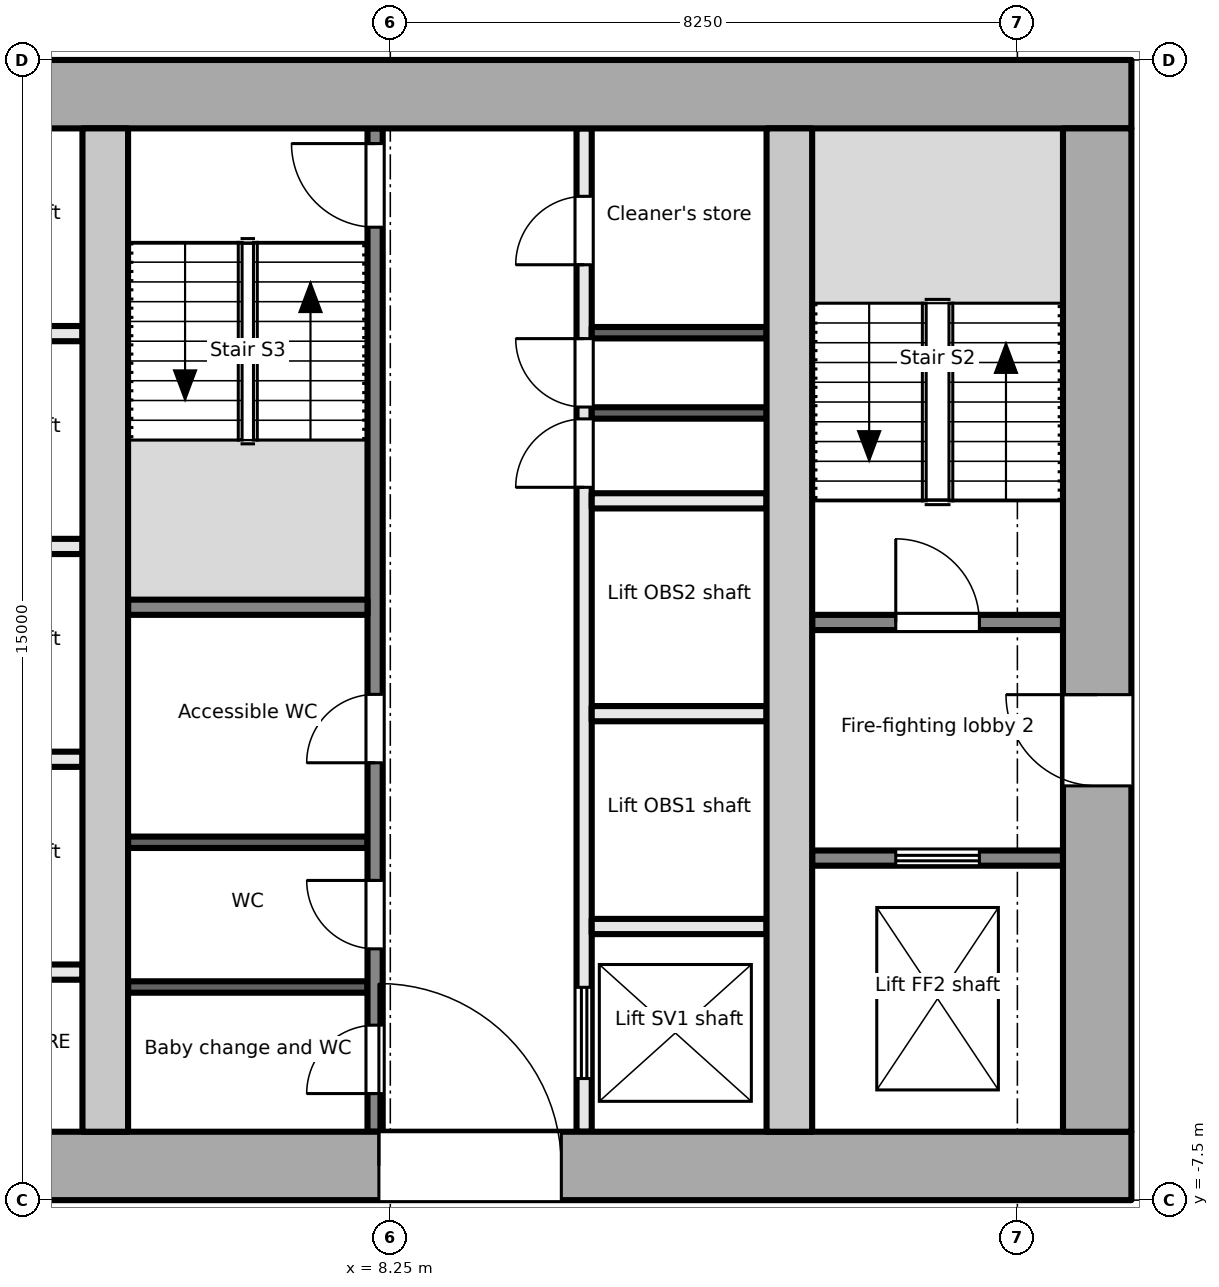
"""IFC4 building model, lengths in metres.
Left out: names, types, materials, properties, quantities, classifications, styles, units other than length and angle.
Written with IfcOpenShell. Run it as: python <this file> out.ifc"""

import sys

from ifc_helpers import new_model, si_unit, direction, frame, frame_2d, origin, place, context, subcontext, project, spatial, rectangle, extrude, element, fill, save


model = new_model("IFC4")
c1 = context("Model", 3, precision=1e-05, world=origin(), true_north=direction((0.0, 1.0)))
c2 = subcontext(c1, "Body", "Model", "MODEL_VIEW")
j1 = project(units=[si_unit("LENGTHUNIT", "METRE"), si_unit("PLANEANGLEUNIT", "RADIAN")], contexts=[c1])
p1 = place(None, origin())
s1 = spatial("IfcSite", under=j1, at=p1, CompositionType="ELEMENT")
p2 = place(p1, origin())
s2 = spatial("IfcBuilding", under=s1, at=p2, CompositionType="ELEMENT")
p3 = place(p2, frame((0.0, 0.0, 79.7)))
s3 = spatial("IfcBuildingStorey", under=s2, at=p3, CompositionType="ELEMENT", Elevation=79.7)
p4 = place(p3, frame((-18.0, -7.05, -0.2), z_axis=(0.0, 0.0, 1.0), x_axis=(1.0, 0.0, 0.0)))
e1 = element("IfcWall", 1, at=p4, inside=s3, PredefinedType="SHEAR", context=c2, shape_type="SweptSolid", body=[
    extrude(rectangle(XDim=36.0, YDim=0.9, at=frame_2d((18.0, 0.0))), origin(), (0.0, 0.0, 1.0), 4.0),
])
p5 = place(p4, frame((7.8, 0.0, 0.2)))
e2 = element("IfcOpeningElement", 2, at=p5, cuts=e1, PredefinedType="OPENING", context=c2, shape_type="SweptSolid", body=[
    extrude(rectangle(XDim=2.4, YDim=2.1, at=frame_2d((1.2, 1.05))), frame((0.0, 0.46, 0.0), z_axis=(0.0, -1.0, 0.0), x_axis=(1.0, 0.0, 0.0)), (0.0, 0.0, 1.0), 0.921),
])
p6 = place(p4, frame((17.4, 0.0, 0.2)))
e3 = element("IfcOpeningElement", 3, at=p6, cuts=e1, PredefinedType="OPENING", context=c2, shape_type="SweptSolid", body=[
    extrude(rectangle(XDim=1.2, YDim=2.1, at=frame_2d((0.6, 1.05))), frame((0.0, 0.46, 0.0), z_axis=(0.0, -1.0, 0.0), x_axis=(1.0, 0.0, 0.0)), (0.0, 0.0, 1.0), 0.921),
])
p7 = place(p4, frame((26.1, 0.0, 0.2)))
e4 = element("IfcOpeningElement", 4, at=p7, cuts=e1, PredefinedType="OPENING", context=c2, shape_type="SweptSolid", body=[
    extrude(rectangle(XDim=2.4, YDim=2.1, at=frame_2d((1.2, 1.05))), frame((0.0, 0.46, 0.0), z_axis=(0.0, -1.0, 0.0), x_axis=(1.0, 0.0, 0.0)), (0.0, 0.0, 1.0), 0.921),
])
p8 = place(p3, frame((-18.0, 7.05, -0.2), z_axis=(0.0, 0.0, 1.0), x_axis=(1.0, 0.0, 0.0)))
e5 = element("IfcWall", 5, at=p8, inside=s3, PredefinedType="SHEAR", context=c2, shape_type="SweptSolid", body=[
    extrude(rectangle(XDim=36.0, YDim=0.9, at=frame_2d((18.0, 0.0))), origin(), (0.0, 0.0, 1.0), 4.0),
])
p9 = place(p3, frame((17.55, -6.6, -0.2), z_axis=(0.0, 0.0, 1.0), x_axis=(0.0, 1.0, 0.0)))
e6 = element("IfcWall", 6, at=p9, inside=s3, PredefinedType="SHEAR", context=c2, shape_type="SweptSolid", body=[
    extrude(rectangle(XDim=13.2, YDim=0.9, at=frame_2d((6.6, 0.0))), origin(), (0.0, 0.0, 1.0), 4.0),
])
p10 = place(p9, frame((4.55, 0.0, 0.2)))
e7 = element("IfcOpeningElement", 7, at=p10, cuts=e6, PredefinedType="OPENING", context=c2, shape_type="SweptSolid", body=[
    extrude(rectangle(XDim=1.2, YDim=2.1, at=frame_2d((0.6, 1.05))), frame((0.0, 0.46, 0.0), z_axis=(0.0, -1.0, 0.0), x_axis=(1.0, 0.0, 0.0)), (0.0, 0.0, 1.0), 0.921),
])
for number, where, z_axis, x_axis in (
    (8, (4.5, -6.6, -0.2), (0.0, 0.0, 1.0), (0.0, 1.0, 0.0)),
    (9, (13.5, -6.6, -0.2), (0.0, 0.0, 1.0), (0.0, 1.0, 0.0)),
):
    element("IfcWall", number, at=place(p3, frame(where, z_axis=z_axis, x_axis=x_axis)), inside=s3, PredefinedType="SHEAR", context=c2, shape_type="SweptSolid", body=[
        extrude(rectangle(XDim=13.2, YDim=0.6, at=frame_2d((6.6, 0.0))), origin(), (0.0, 0.0, 1.0), 4.0),
    ])
p11 = place(p3, frame((13.8, -3.0, 0.0), z_axis=(0.0, 0.0, 1.0), x_axis=(1.0, 0.0, 0.0)))
e10 = element("IfcWall", 10, at=p11, inside=s3, PredefinedType="PARTITIONING", context=c2, shape_type="SweptSolid", body=[
    extrude(rectangle(XDim=3.3, YDim=0.2, at=frame_2d((1.65, 0.0))), origin(), (0.0, 0.0, 1.0), 3.8),
])
p12 = place(p11, frame((1.1, 0.0, 0.0)))
e11 = element("IfcOpeningElement", 11, at=p12, cuts=e10, PredefinedType="OPENING", context=c2, shape_type="SweptSolid", body=[
    extrude(rectangle(XDim=1.1, YDim=2.1, at=frame_2d((0.55, 1.05))), frame((0.0, 0.111, 0.0), z_axis=(0.0, -1.0, 0.0), x_axis=(1.0, 0.0, 0.0)), (0.0, 0.0, 1.0), 0.221),
])
p13 = place(p3, frame((13.8, 0.1, 0.0), z_axis=(0.0, 0.0, 1.0), x_axis=(1.0, 0.0, 0.0)))
e12 = element("IfcWall", 12, at=p13, inside=s3, PredefinedType="PARTITIONING", context=c2, shape_type="SweptSolid", body=[
    extrude(rectangle(XDim=3.3, YDim=0.2, at=frame_2d((1.65, 0.0))), origin(), (0.0, 0.0, 1.0), 3.8),
])
p14 = place(p13, frame((1.1, 0.0, 0.0)))
e13 = element("IfcOpeningElement", 13, at=p14, cuts=e12, PredefinedType="OPENING", context=c2, shape_type="SweptSolid", body=[
    extrude(rectangle(XDim=1.1, YDim=2.1, at=frame_2d((0.55, 1.05))), frame((0.0, 0.111, 0.0), z_axis=(0.0, -1.0, 0.0), x_axis=(1.0, 0.0, 0.0)), (0.0, 0.0, 1.0), 0.221),
])
for number, where, z_axis, x_axis in (
    (14, (1.9, -1.7, 0.0), (0.0, 0.0, 1.0), (1.0, 0.0, 0.0)),
    (15, (1.9, 1.1, 0.0), (0.0, 0.0, 1.0), (1.0, 0.0, 0.0)),
    (16, (1.9, 3.9, 0.0), (0.0, 0.0, 1.0), (1.0, 0.0, 0.0)),
    (17, (1.9, -4.5, 0.0), (0.0, 0.0, 1.0), (1.0, 0.0, 0.0)),
):
    element("IfcWall", number, at=place(p3, frame(where, z_axis=z_axis, x_axis=x_axis)), inside=s3, PredefinedType="PARTITIONING", context=c2, shape_type="SweptSolid", body=[
        extrude(rectangle(XDim=2.3, YDim=0.2, at=frame_2d((1.15, 0.0))), origin(), (0.0, 0.0, 1.0), 3.8),
    ])
p15 = place(p3, frame((8.05, -6.6, 0.0), z_axis=(0.0, 0.0, 1.0), x_axis=(0.0, 1.0, 0.0)))
e18 = element("IfcWall", 18, at=p15, inside=s3, PredefinedType="PARTITIONING", context=c2, shape_type="SweptSolid", body=[
    extrude(rectangle(XDim=13.2, YDim=0.2, at=frame_2d((6.6, 0.0))), origin(), (0.0, 0.0, 1.0), 3.8),
])
p16 = place(p15, frame((0.502, 0.0, 0.0)))
e19 = element("IfcOpeningElement", 19, at=p16, cuts=e18, PredefinedType="OPENING", context=c2, shape_type="SweptSolid", body=[
    extrude(rectangle(XDim=0.9, YDim=2.1, at=frame_2d((0.45, 1.05))), frame((0.0, 0.111, 0.0), z_axis=(0.0, -1.0, 0.0), x_axis=(1.0, 0.0, 0.0)), (0.0, 0.0, 1.0), 0.221),
])
p17 = place(p15, frame((2.406, 0.0, 0.0)))
e20 = element("IfcOpeningElement", 20, at=p17, cuts=e18, PredefinedType="OPENING", context=c2, shape_type="SweptSolid", body=[
    extrude(rectangle(XDim=0.9, YDim=2.1, at=frame_2d((0.45, 1.05))), frame((0.0, 0.111, 0.0), z_axis=(0.0, -1.0, 0.0), x_axis=(1.0, 0.0, 0.0)), (0.0, 0.0, 1.0), 0.221),
])
p18 = place(p15, frame((4.854, 0.0, 0.0)))
e21 = element("IfcOpeningElement", 21, at=p18, cuts=e18, PredefinedType="OPENING", context=c2, shape_type="SweptSolid", body=[
    extrude(rectangle(XDim=0.9, YDim=2.1, at=frame_2d((0.45, 1.05))), frame((0.0, 0.111, 0.0), z_axis=(0.0, -1.0, 0.0), x_axis=(1.0, 0.0, 0.0)), (0.0, 0.0, 1.0), 0.221),
])
p19 = place(p15, frame((11.9, 0.0, 0.0)))
e22 = element("IfcOpeningElement", 22, at=p19, cuts=e18, PredefinedType="OPENING", context=c2, shape_type="SweptSolid", body=[
    extrude(rectangle(XDim=1.1, YDim=2.1, at=frame_2d((0.55, 1.05))), frame((0.0, 0.111, 0.0), z_axis=(0.0, -1.0, 0.0), x_axis=(1.0, 0.0, 0.0)), (0.0, 0.0, 1.0), 0.221),
])
p20 = place(p3, frame((10.8, -6.6, 0.0), z_axis=(0.0, 0.0, 1.0), x_axis=(0.0, 1.0, 0.0)))
e23 = element("IfcWall", 23, at=p20, inside=s3, PredefinedType="PARTITIONING", context=c2, shape_type="SweptSolid", body=[
    extrude(rectangle(XDim=13.2, YDim=0.2, at=frame_2d((6.6, 0.0))), origin(), (0.0, 0.0, 1.0), 3.8),
])
p21 = place(p20, frame((0.7, 0.0, 0.0)))
e24 = element("IfcOpeningElement", 24, at=p21, cuts=e23, PredefinedType="OPENING", context=c2, shape_type="SweptSolid", body=[
    extrude(rectangle(XDim=1.2, YDim=2.1, at=frame_2d((0.6, 1.05))), frame((0.0, 0.111, 0.0), z_axis=(0.0, -1.0, 0.0), x_axis=(1.0, 0.0, 0.0)), (0.0, 0.0, 1.0), 0.221),
])
p22 = place(p20, frame((8.478, 0.0, 0.0)))
e25 = element("IfcOpeningElement", 25, at=p22, cuts=e23, PredefinedType="OPENING", context=c2, shape_type="SweptSolid", body=[
    extrude(rectangle(XDim=0.9, YDim=2.1, at=frame_2d((0.45, 1.05))), frame((0.0, 0.111, 0.0), z_axis=(0.0, -1.0, 0.0), x_axis=(1.0, 0.0, 0.0)), (0.0, 0.0, 1.0), 0.221),
])
p23 = place(p20, frame((9.534, 0.0, 0.0)))
e26 = element("IfcOpeningElement", 26, at=p23, cuts=e23, PredefinedType="OPENING", context=c2, shape_type="SweptSolid", body=[
    extrude(rectangle(XDim=0.9, YDim=2.1, at=frame_2d((0.45, 1.05))), frame((0.0, 0.111, 0.0), z_axis=(0.0, -1.0, 0.0), x_axis=(1.0, 0.0, 0.0)), (0.0, 0.0, 1.0), 0.221),
])
p24 = place(p20, frame((11.406, 0.0, 0.0)))
e27 = element("IfcOpeningElement", 27, at=p24, cuts=e23, PredefinedType="OPENING", context=c2, shape_type="SweptSolid", body=[
    extrude(rectangle(XDim=0.9, YDim=2.1, at=frame_2d((0.45, 1.05))), frame((0.0, 0.111, 0.0), z_axis=(0.0, -1.0, 0.0), x_axis=(1.0, 0.0, 0.0)), (0.0, 0.0, 1.0), 0.221),
])
p25 = place(p3, frame((4.8, 0.3, 0.0), z_axis=(0.0, 0.0, 1.0), x_axis=(1.0, 0.0, 0.0)))
e28 = element("IfcWall", 28, at=p25, inside=s3, PredefinedType="PARTITIONING", context=c2, shape_type="SweptSolid", body=[
    extrude(rectangle(XDim=3.15, YDim=0.2, at=frame_2d((1.575, 0.0))), origin(), (0.0, 0.0, 1.0), 3.8),
])
for number, where, z_axis, x_axis in (
    (29, (4.8, -4.696, 0.0), (0.0, 0.0, 1.0), (1.0, 0.0, 0.0)),
    (30, (4.8, -2.792, 0.0), (0.0, 0.0, 1.0), (1.0, 0.0, 0.0)),
):
    element("IfcWall", number, at=place(p3, frame(where, z_axis=z_axis, x_axis=x_axis)), inside=s3, PredefinedType="PARTITIONING", context=c2, shape_type="SweptSolid", body=[
        extrude(rectangle(XDim=3.15, YDim=0.15, at=frame_2d((1.575, 0.0))), origin(), (0.0, 0.0, 1.0), 3.8),
    ])
for number, where, z_axis, x_axis in (
    (31, (10.9, -3.9, 0.0), (0.0, 0.0, 1.0), (1.0, 0.0, 0.0)),
    (32, (10.9, -1.1, 0.0), (0.0, 0.0, 1.0), (1.0, 0.0, 0.0)),
    (33, (10.9, 1.7, 0.0), (0.0, 0.0, 1.0), (1.0, 0.0, 0.0)),
):
    element("IfcWall", number, at=place(p3, frame(where, z_axis=z_axis, x_axis=x_axis)), inside=s3, PredefinedType="PARTITIONING", context=c2, shape_type="SweptSolid", body=[
        extrude(rectangle(XDim=2.3, YDim=0.2, at=frame_2d((1.15, 0.0))), origin(), (0.0, 0.0, 1.0), 3.8),
    ])
for number, where, z_axis, x_axis in (
    (34, (10.9, 2.856, 0.0), (0.0, 0.0, 1.0), (1.0, 0.0, 0.0)),
    (35, (10.9, 3.912, 0.0), (0.0, 0.0, 1.0), (1.0, 0.0, 0.0)),
):
    element("IfcWall", number, at=place(p3, frame(where, z_axis=z_axis, x_axis=x_axis)), inside=s3, PredefinedType="PARTITIONING", context=c2, shape_type="SweptSolid", body=[
        extrude(rectangle(XDim=2.3, YDim=0.15, at=frame_2d((1.15, 0.0))), origin(), (0.0, 0.0, 1.0), 3.8),
    ])
p26 = place(p12, origin())
e36 = element("IfcDoor", 36, at=p26, inside=s3, OperationType="DOUBLE_DOOR_SLIDING", PredefinedType="DOOR", context=c2, shape_type="SweptSolid", body=[
    extrude(rectangle(XDim=1.1, YDim=2.1, at=frame_2d((0.55, 1.05))), frame((0.0, 0.025, 0.0), z_axis=(0.0, -1.0, 0.0), x_axis=(1.0, 0.0, 0.0)), (0.0, 0.0, 1.0), 0.05),
])
fill(e11, e36)
p27 = place(p10, origin())
e37 = element("IfcDoor", 37, at=p27, inside=s3, OperationType="SINGLE_SWING_RIGHT", PredefinedType="DOOR", context=c2, shape_type="SweptSolid", body=[
    extrude(rectangle(XDim=1.2, YDim=2.1, at=frame_2d((0.6, 1.05))), frame((0.0, 0.025, 0.0), z_axis=(0.0, -1.0, 0.0), x_axis=(1.0, 0.0, 0.0)), (0.0, 0.0, 1.0), 0.05),
])
fill(e7, e37)
p28 = place(p14, origin())
e38 = element("IfcDoor", 38, at=p28, inside=s3, OperationType="SINGLE_SWING_LEFT", PredefinedType="DOOR", context=c2, shape_type="SweptSolid", body=[
    extrude(rectangle(XDim=1.1, YDim=2.1, at=frame_2d((0.55, 1.05))), frame((0.0, 0.025, 0.0), z_axis=(0.0, -1.0, 0.0), x_axis=(1.0, 0.0, 0.0)), (0.0, 0.0, 1.0), 0.05),
])
fill(e13, e38)
p29 = place(p16, origin())
e39 = element("IfcDoor", 39, at=p29, inside=s3, OperationType="SINGLE_SWING_LEFT", PredefinedType="DOOR", context=c2, shape_type="SweptSolid", body=[
    extrude(rectangle(XDim=0.9, YDim=2.1, at=frame_2d((0.45, 1.05))), frame((0.0, 0.025, 0.0), z_axis=(0.0, -1.0, 0.0), x_axis=(1.0, 0.0, 0.0)), (0.0, 0.0, 1.0), 0.05),
])
fill(e19, e39)
p30 = place(p17, origin())
e40 = element("IfcDoor", 40, at=p30, inside=s3, OperationType="SINGLE_SWING_RIGHT", PredefinedType="DOOR", context=c2, shape_type="SweptSolid", body=[
    extrude(rectangle(XDim=0.9, YDim=2.1, at=frame_2d((0.45, 1.05))), frame((0.0, 0.025, 0.0), z_axis=(0.0, -1.0, 0.0), x_axis=(1.0, 0.0, 0.0)), (0.0, 0.0, 1.0), 0.05),
])
fill(e20, e40)
p31 = place(p18, origin())
e41 = element("IfcDoor", 41, at=p31, inside=s3, OperationType="SINGLE_SWING_LEFT", PredefinedType="DOOR", context=c2, shape_type="SweptSolid", body=[
    extrude(rectangle(XDim=0.9, YDim=2.1, at=frame_2d((0.45, 1.05))), frame((0.0, 0.025, 0.0), z_axis=(0.0, -1.0, 0.0), x_axis=(1.0, 0.0, 0.0)), (0.0, 0.0, 1.0), 0.05),
])
fill(e21, e41)
p32 = place(p19, origin())
e42 = element("IfcDoor", 42, at=p32, inside=s3, OperationType="SINGLE_SWING_RIGHT", PredefinedType="DOOR", context=c2, shape_type="SweptSolid", body=[
    extrude(rectangle(XDim=1.1, YDim=2.1, at=frame_2d((0.55, 1.05))), frame((0.0, 0.025, 0.0), z_axis=(0.0, -1.0, 0.0), x_axis=(1.0, 0.0, 0.0)), (0.0, 0.0, 1.0), 0.05),
])
fill(e22, e42)
p33 = place(p7, origin())
e43 = element("IfcDoor", 43, at=p33, inside=s3, OperationType="DOUBLE_DOOR_DOUBLE_SWING", PredefinedType="DOOR", context=c2, shape_type="SweptSolid", body=[
    extrude(rectangle(XDim=2.4, YDim=2.1, at=frame_2d((1.2, 1.05))), frame((0.0, 0.025, 0.0), z_axis=(0.0, -1.0, 0.0), x_axis=(1.0, 0.0, 0.0)), (0.0, 0.0, 1.0), 0.05),
])
fill(e4, e43)
p34 = place(p21, origin())
e44 = element("IfcDoor", 44, at=p34, inside=s3, OperationType="DOUBLE_DOOR_SLIDING", PredefinedType="DOOR", context=c2, shape_type="SweptSolid", body=[
    extrude(rectangle(XDim=1.2, YDim=2.1, at=frame_2d((0.6, 1.05))), frame((0.0, 0.025, 0.0), z_axis=(0.0, -1.0, 0.0), x_axis=(1.0, 0.0, 0.0)), (0.0, 0.0, 1.0), 0.05),
])
fill(e24, e44)
p35 = place(p22, origin())
e45 = element("IfcDoor", 45, at=p35, inside=s3, OperationType="SINGLE_SWING_LEFT", PredefinedType="DOOR", context=c2, shape_type="SweptSolid", body=[
    extrude(rectangle(XDim=0.9, YDim=2.1, at=frame_2d((0.45, 1.05))), frame((0.0, 0.025, 0.0), z_axis=(0.0, -1.0, 0.0), x_axis=(1.0, 0.0, 0.0)), (0.0, 0.0, 1.0), 0.05),
])
fill(e25, e45)
p36 = place(p23, origin())
e46 = element("IfcDoor", 46, at=p36, inside=s3, OperationType="SINGLE_SWING_RIGHT", PredefinedType="DOOR", context=c2, shape_type="SweptSolid", body=[
    extrude(rectangle(XDim=0.9, YDim=2.1, at=frame_2d((0.45, 1.05))), frame((0.0, 0.025, 0.0), z_axis=(0.0, -1.0, 0.0), x_axis=(1.0, 0.0, 0.0)), (0.0, 0.0, 1.0), 0.05),
])
fill(e26, e46)
p37 = place(p24, origin())
e47 = element("IfcDoor", 47, at=p37, inside=s3, OperationType="SINGLE_SWING_LEFT", PredefinedType="DOOR", context=c2, shape_type="SweptSolid", body=[
    extrude(rectangle(XDim=0.9, YDim=2.1, at=frame_2d((0.45, 1.05))), frame((0.0, 0.025, 0.0), z_axis=(0.0, -1.0, 0.0), x_axis=(1.0, 0.0, 0.0)), (0.0, 0.0, 1.0), 0.05),
])
fill(e27, e47)
save(model, sys.argv[1])
